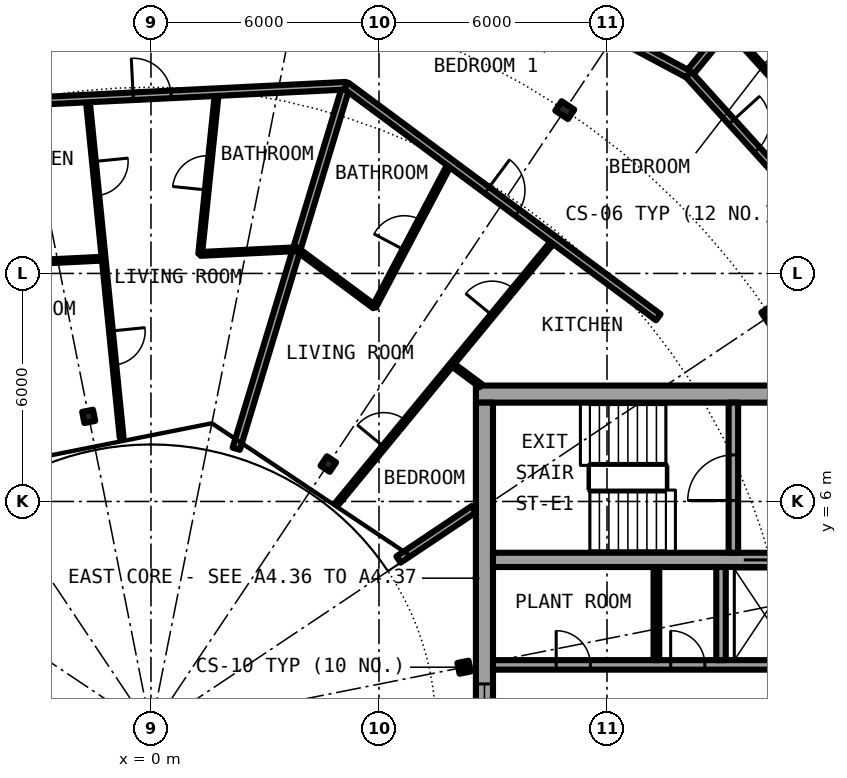
"""IFC4 building model, lengths in metres.
Left out: names, types, materials, properties, quantities, classifications, styles, units other than length and angle.
Written with IfcOpenShell. Run it as: python <this file> out.ifc"""

import sys

from ifc_helpers import new_model, si_unit, direction, frame, frame_2d, origin, origin_2d, place, context, subcontext, project, spatial, rectangle, i_section, extrude, element, fill, save


model = new_model("IFC4")
c1 = context("Model", 3, precision=1e-05, world=origin(), true_north=direction((0.0, 1.0)))
c2 = subcontext(c1, "Body", "Model", "MODEL_VIEW")
j1 = project(units=[si_unit("LENGTHUNIT", "METRE"), si_unit("PLANEANGLEUNIT", "RADIAN")], contexts=[c1])
p1 = place(None, origin())
s1 = spatial("IfcSite", under=j1, at=p1, CompositionType="ELEMENT")
p2 = place(p1, origin())
s2 = spatial("IfcBuilding", under=s1, at=p2, CompositionType="ELEMENT")
p3 = place(p2, frame((0.0, 0.0, 202.4)))
s3 = spatial("IfcBuildingStorey", under=s2, at=p3, CompositionType="ELEMENT", Elevation=202.4)
for number, where, z_axis, x_axis in (
    (1, (16.297, 10.889, 0.0), (0.0, 0.0, 1.0), (0.831, 0.556, 0.0)),
    (2, (10.889, 16.297, 0.0), (0.0, 0.0, 1.0), (0.556, 0.831, 0.0)),
):
    element("IfcColumn", number, at=place(p3, frame(where, z_axis=z_axis, x_axis=x_axis)), inside=s3, PredefinedType="COLUMN", context=c2, shape_type="SweptSolid", body=[
        extrude(i_section(OverallWidth=0.3, OverallDepth=0.4, WebThickness=0.013, FlangeThickness=0.024, FilletRadius=0.027, at=origin_2d()), origin(), (0.0, 0.0, 1.0), 3.05),
    ])
for number, where, z_axis, x_axis in (
    (3, (8.239, 1.639, 0.0), (0.0, 0.0, 1.0), (0.981, 0.195, 0.0)),
    (4, (4.667, 6.984, 0.0), (0.0, 0.0, 1.0), (0.556, 0.831, 0.0)),
    (5, (-1.639, 8.239, 0.0), (0.0, 0.0, 1.0), (-0.195, 0.981, 0.0)),
):
    element("IfcColumn", number, at=place(p3, frame(where, z_axis=z_axis, x_axis=x_axis)), inside=s3, PredefinedType="COLUMN", context=c2, shape_type="SweptSolid", body=[
        extrude(i_section(OverallWidth=0.3, OverallDepth=0.29, WebThickness=0.009, FlangeThickness=0.014, FilletRadius=0.027, at=origin_2d()), origin(), (0.0, 0.0, 1.0), 3.05),
    ])
p4 = place(p3, frame((22.05, 8.825, 0.0), z_axis=(0.0, 0.0, 1.0), x_axis=(-1.0, 0.0, 0.0)))
e6 = element("IfcWall", 6, at=p4, inside=s3, PredefinedType="SHEAR", context=c2, shape_type="SweptSolid", body=[
    extrude(rectangle(XDim=13.5, YDim=0.45, at=frame_2d((6.75, 0.0))), origin(), (0.0, 0.0, 1.0), 3.05),
])
p5 = place(p4, frame((0.975, 0.0, 0.0)))
e7 = element("IfcOpeningElement", 7, at=p5, cuts=e6, PredefinedType="OPENING", context=c2, shape_type="SweptSolid", body=[
    extrude(rectangle(XDim=1.2, YDim=2.3, at=frame_2d((0.6, 1.15))), frame((0.0, 0.235, 0.0), z_axis=(0.0, -1.0, 0.0), x_axis=(1.0, 0.0, 0.0)), (0.0, 0.0, 1.0), 0.47),
])
p6 = place(p3, frame((8.775, -8.6, 0.0), z_axis=(0.0, 0.0, 1.0), x_axis=(0.0, 1.0, 0.0)))
e8 = element("IfcWall", 8, at=p6, inside=s3, PredefinedType="SHEAR", context=c2, shape_type="SweptSolid", body=[
    extrude(rectangle(XDim=17.2, YDim=0.45, at=frame_2d((8.6, 0.0))), origin(), (0.0, 0.0, 1.0), 3.05),
])
p7 = place(p6, frame((7.4, 0.0, 0.1)))
e9 = element("IfcOpeningElement", 9, at=p7, cuts=e8, PredefinedType="OPENING", context=c2, shape_type="SweptSolid", body=[
    extrude(rectangle(XDim=2.4, YDim=2.2, at=frame_2d((1.2, 1.1))), frame((0.0, 0.235, 0.0), z_axis=(0.0, -1.0, 0.0), x_axis=(1.0, 0.0, 0.0)), (0.0, 0.0, 1.0), 0.47),
])
p8 = place(p3, frame((9.0, 1.7, 0.0), z_axis=(0.0, 0.0, 1.0), x_axis=(1.0, 0.0, 0.0)))
e10 = element("IfcWall", 10, at=p8, inside=s3, PredefinedType="SHEAR", context=c2, shape_type="SweptSolid", body=[
    extrude(rectangle(XDim=10.15, YDim=0.25, at=frame_2d((5.075, 0.0))), origin(), (0.0, 0.0, 1.0), 3.05),
])
p9 = place(p8, frame((1.663, 0.0, 0.0)))
e11 = element("IfcOpeningElement", 11, at=p9, cuts=e10, PredefinedType="OPENING", context=c2, shape_type="SweptSolid", body=[
    extrude(rectangle(XDim=0.9, YDim=2.3, at=frame_2d((0.45, 1.15))), frame((0.0, 0.135, 0.0), z_axis=(0.0, -1.0, 0.0), x_axis=(1.0, 0.0, 0.0)), (0.0, 0.0, 1.0), 0.27),
])
p10 = place(p8, frame((4.675, 0.0, 0.0)))
e12 = element("IfcOpeningElement", 12, at=p10, cuts=e10, PredefinedType="OPENING", context=c2, shape_type="SweptSolid", body=[
    extrude(rectangle(XDim=0.9, YDim=2.3, at=frame_2d((0.45, 1.15))), frame((0.0, 0.135, 0.0), z_axis=(0.0, -1.0, 0.0), x_axis=(1.0, 0.0, 0.0)), (0.0, 0.0, 1.0), 0.27),
])
p11 = place(p8, frame((8.837, 0.0, 0.0)))
e13 = element("IfcOpeningElement", 13, at=p11, cuts=e10, PredefinedType="OPENING", context=c2, shape_type="SweptSolid", body=[
    extrude(rectangle(XDim=0.9, YDim=2.3, at=frame_2d((0.45, 1.15))), frame((0.0, 0.135, 0.0), z_axis=(0.0, -1.0, 0.0), x_axis=(1.0, 0.0, 0.0)), (0.0, 0.0, 1.0), 0.27),
])
p12 = place(p3, frame((9.0, 4.462, 0.0), z_axis=(0.0, 0.0, 1.0), x_axis=(1.0, 0.0, 0.0)))
e14 = element("IfcWall", 14, at=p12, inside=s3, PredefinedType="SHEAR", context=c2, shape_type="SweptSolid", body=[
    extrude(rectangle(XDim=10.15, YDim=0.375, at=frame_2d((5.075, 0.0))), origin(), (0.0, 0.0, 1.0), 3.05),
])
p13 = place(p12, frame((6.6, 0.0, 0.0)))
e15 = element("IfcOpeningElement", 15, at=p13, cuts=e14, PredefinedType="OPENING", context=c2, shape_type="SweptSolid", body=[
    extrude(rectangle(XDim=1.1, YDim=2.3, at=frame_2d((0.55, 1.15))), frame((0.0, 0.198, 0.0), z_axis=(0.0, -1.0, 0.0), x_axis=(1.0, 0.0, 0.0)), (0.0, 0.0, 1.0), 0.395),
])
p14 = place(p3, frame((15.325, 4.65, 0.0), z_axis=(0.0, 0.0, 1.0), x_axis=(0.0, 1.0, 0.0)))
e16 = element("IfcWall", 16, at=p14, inside=s3, PredefinedType="SHEAR", context=c2, shape_type="SweptSolid", body=[
    extrude(rectangle(XDim=3.95, YDim=0.25, at=frame_2d((1.975, 0.0))), origin(), (0.0, 0.0, 1.0), 3.05),
])
p15 = place(p14, frame((1.375, 0.0, 0.0)))
e17 = element("IfcOpeningElement", 17, at=p15, cuts=e16, PredefinedType="OPENING", context=c2, shape_type="SweptSolid", body=[
    extrude(rectangle(XDim=1.2, YDim=2.3, at=frame_2d((0.6, 1.15))), frame((0.0, 0.135, 0.0), z_axis=(0.0, -1.0, 0.0), x_axis=(1.0, 0.0, 0.0)), (0.0, 0.0, 1.0), 0.27),
])
p16 = place(p3, frame((15.0, 1.825, 0.0), z_axis=(0.0, 0.0, 1.0), x_axis=(0.0, 1.0, 0.0)))
e18 = element("IfcWall", 18, at=p16, inside=s3, PredefinedType="SOLIDWALL", context=c2, shape_type="SweptSolid", body=[
    extrude(rectangle(XDim=2.45, YDim=0.25, at=frame_2d((1.225, 0.0))), origin(), (0.0, 0.0, 1.0), 2.7),
])
p17 = place(p3, frame((13.3, 1.825, 0.0), z_axis=(0.0, 0.0, 1.0), x_axis=(0.0, 1.0, 0.0)))
e19 = element("IfcWall", 19, at=p17, inside=s3, PredefinedType="PARTITIONING", context=c2, shape_type="SweptSolid", body=[
    extrude(rectangle(XDim=2.45, YDim=0.15, at=frame_2d((1.225, 0.0))), origin(), (0.0, 0.0, 1.0), 2.7),
])
p18 = place(p3, frame((-1.668, 16.603, 0.0), z_axis=(0.0, 0.0, 1.0), x_axis=(0.099921543882, -0.994995319119, 0.0)))
e20 = element("IfcWall", 20, at=p18, inside=s3, PredefinedType="PARTITIONING", context=c2, shape_type="SweptSolid", body=[
    extrude(rectangle(XDim=8.967, YDim=0.1, at=frame_2d((4.483, 0.0))), origin(), (0.0, 0.0, 1.0), 2.7),
])
p19 = place(p18, frame((1.667, 0.0, 0.0)))
e21 = element("IfcOpeningElement", 21, at=p19, cuts=e20, PredefinedType="OPENING", context=c2, shape_type="SweptSolid", body=[
    extrude(rectangle(XDim=0.9, YDim=2.3, at=frame_2d((0.45, 1.15))), frame((0.0, 0.06, 0.0), z_axis=(0.0, -1.0, 0.0), x_axis=(1.0, 0.0, 0.0)), (0.0, 0.0, 1.0), 0.12),
])
p20 = place(p18, frame((6.15, 0.0, 0.0)))
e22 = element("IfcOpeningElement", 22, at=p20, cuts=e20, PredefinedType="OPENING", context=c2, shape_type="SweptSolid", body=[
    extrude(rectangle(XDim=0.9, YDim=2.3, at=frame_2d((0.45, 1.15))), frame((0.0, 0.06, 0.0), z_axis=(0.0, -1.0, 0.0), x_axis=(1.0, 0.0, 0.0)), (0.0, 0.0, 1.0), 0.12),
])
p21 = place(p3, frame((1.295, 12.515, 0.0), z_axis=(0.0, 0.0, 1.0), x_axis=(0.102875790791, 0.994694210131, 0.0)))
e23 = element("IfcWall", 23, at=p21, inside=s3, PredefinedType="PARTITIONING", context=c2, shape_type="SweptSolid", body=[
    extrude(rectangle(XDim=4.279, YDim=0.1, at=frame_2d((2.139, 0.0))), origin(), (0.0, 0.0, 1.0), 2.7),
])
p22 = place(p21, frame((1.689, 0.0, 0.0)))
e24 = element("IfcOpeningElement", 24, at=p22, cuts=e23, PredefinedType="OPENING", context=c2, shape_type="SweptSolid", body=[
    extrude(rectangle(XDim=0.9, YDim=2.3, at=frame_2d((0.45, 1.15))), frame((0.0, 0.06, 0.0), z_axis=(0.0, -1.0, 0.0), x_axis=(1.0, 0.0, 0.0)), (0.0, 0.0, 1.0), 0.12),
])
p23 = place(p3, frame((2.244, 7.387, 0.0), z_axis=(0.0, 0.0, 1.0), x_axis=(0.290078004911, 0.957003004732, 0.0)))
e25 = element("IfcWall", 25, at=p23, inside=s3, PredefinedType="PARTITIONING", context=c2, shape_type="SweptSolid", body=[
    extrude(rectangle(XDim=9.98, YDim=0.2, at=frame_2d((4.99, 0.0))), origin(), (0.0, 0.0, 1.0), 2.7),
])
p24 = place(p3, frame((4.909, 5.958, 0.0), z_axis=(0.0, 0.0, 1.0), x_axis=(0.635879010442, 0.771788756124, 0.0)))
e26 = element("IfcWall", 26, at=p24, inside=s3, PredefinedType="PARTITIONING", context=c2, shape_type="SweptSolid", body=[
    extrude(rectangle(XDim=8.967, YDim=0.1, at=frame_2d((4.484, 0.0))), origin(), (0.0, 0.0, 1.0), 2.7),
])
p25 = place(p24, frame((6.4, 0.0, 0.0)))
e27 = element("IfcOpeningElement", 27, at=p25, cuts=e26, PredefinedType="OPENING", context=c2, shape_type="SweptSolid", body=[
    extrude(rectangle(XDim=0.9, YDim=2.3, at=frame_2d((0.45, 1.15))), frame((0.0, 0.06, 0.0), z_axis=(0.0, -1.0, 0.0), x_axis=(1.0, 0.0, 0.0)), (0.0, 0.0, 1.0), 0.12),
])
p26 = place(p24, frame((1.917, 0.0, 0.0)))
e28 = element("IfcOpeningElement", 28, at=p26, cuts=e26, PredefinedType="OPENING", context=c2, shape_type="SweptSolid", body=[
    extrude(rectangle(XDim=0.9, YDim=2.3, at=frame_2d((0.45, 1.15))), frame((0.0, 0.06, 0.0), z_axis=(0.0, -1.0, 0.0), x_axis=(1.0, 0.0, 0.0)), (0.0, 0.0, 1.0), 0.12),
])
p27 = place(p3, frame((5.877, 11.125, 0.0), z_axis=(0.0, 0.0, 1.0), x_axis=(0.467030118529, 0.884241408432, 0.0)))
e29 = element("IfcWall", 29, at=p27, inside=s3, PredefinedType="PARTITIONING", context=c2, shape_type="SweptSolid", body=[
    extrude(rectangle(XDim=4.278, YDim=0.1, at=frame_2d((2.139, 0.0))), origin(), (0.0, 0.0, 1.0), 2.7),
])
p28 = place(p27, frame((1.689, 0.0, 0.0)))
e30 = element("IfcOpeningElement", 30, at=p28, cuts=e29, PredefinedType="OPENING", context=c2, shape_type="SweptSolid", body=[
    extrude(rectangle(XDim=0.9, YDim=2.3, at=frame_2d((0.45, 1.15))), frame((0.0, 0.06, 0.0), z_axis=(0.0, -1.0, 0.0), x_axis=(1.0, 0.0, 0.0)), (0.0, 0.0, 1.0), 0.12),
])
p29 = place(p3, frame((14.147, 17.238, 0.0), z_axis=(0.0, 0.0, 1.0), x_axis=(0.634374159378, 0.773026148273, 0.0)))
e31 = element("IfcWall", 31, at=p29, inside=s3, PredefinedType="PARTITIONING", context=c2, shape_type="SweptSolid", body=[
    extrude(rectangle(XDim=4.876, YDim=0.2, at=frame_2d((2.438, 0.0))), origin(), (0.0, 0.0, 1.0), 2.7),
])
p30 = place(p3, frame((6.513, 4.472, 0.0), z_axis=(0.0, 0.0, 1.0), x_axis=(0.831403409976, 0.555669299026, 0.0)))
e32 = element("IfcWall", 32, at=p30, inside=s3, PredefinedType="PARTITIONING", context=c2, shape_type="SweptSolid", body=[
    extrude(rectangle(XDim=2.383, YDim=0.2, at=frame_2d((1.191, 0.0))), origin(), (0.0, 0.0, 1.0), 2.7),
])
p31 = place(p3, frame((-5.055, 12.204, 0.0), z_axis=(0.0, 0.0, 1.0), x_axis=(0.998816217325, 0.048643231882, 0.0)))
e33 = element("IfcWall", 33, at=p31, inside=s3, PredefinedType="PARTITIONING", context=c2, shape_type="SweptSolid", body=[
    extrude(rectangle(XDim=3.82, YDim=0.1, at=frame_2d((1.91, 0.0))), origin(), (0.0, 0.0, 1.0), 2.7),
])
p32 = place(p3, frame((1.3, 12.514, 0.0), z_axis=(0.0, 0.0, 1.0), x_axis=(0.99880915717, 0.048787985754, 0.0)))
e34 = element("IfcWall", 34, at=p32, inside=s3, PredefinedType="PARTITIONING", context=c2, shape_type="SweptSolid", body=[
    extrude(rectangle(XDim=2.542, YDim=0.1, at=frame_2d((1.271, 0.0))), origin(), (0.0, 0.0, 1.0), 2.7),
])
p33 = place(p3, frame((3.834, 12.64, 0.0), z_axis=(0.0, 0.0, 1.0), x_axis=(0.803259509791, -0.595629213463, 0.0)))
e35 = element("IfcWall", 35, at=p33, inside=s3, PredefinedType="PARTITIONING", context=c2, shape_type="SweptSolid", body=[
    extrude(rectangle(XDim=2.543, YDim=0.1, at=frame_2d((1.272, 0.0))), origin(), (0.0, 0.0, 1.0), 2.7),
])
p34 = place(p3, frame((7.922, 9.609, 0.0), z_axis=(0.0, 0.0, 1.0), x_axis=(0.802974061841, -0.596013972999, 0.0)))
e36 = element("IfcWall", 36, at=p34, inside=s3, PredefinedType="PARTITIONING", context=c2, shape_type="SweptSolid", body=[
    extrude(rectangle(XDim=0.943, YDim=0.1, at=frame_2d((0.471, 0.0))), origin(), (0.0, 0.0, 1.0), 2.7),
])
p35 = place(p3, frame((-6.783, 16.35, 0.0), z_axis=(0.0, 0.0, 1.0), x_axis=(0.998781156301, 0.049357895202, 0.0)))
e37 = element("IfcWall", 37, at=p35, inside=s3, PredefinedType="PARTITIONING", context=c2, shape_type="SweptSolid", body=[
    extrude(rectangle(XDim=11.931, YDim=0.2, at=frame_2d((5.965, 0.0))), origin(), (0.0, 0.0, 1.0), 2.7),
])
p36 = place(p35, frame((6.322, 0.0, 0.0)))
e38 = element("IfcOpeningElement", 38, at=p36, cuts=e37, PredefinedType="OPENING", context=c2, shape_type="SweptSolid", body=[
    extrude(rectangle(XDim=1.0, YDim=2.3, at=frame_2d((0.5, 1.15))), frame((0.0, 0.11, 0.0), z_axis=(0.0, -1.0, 0.0), x_axis=(1.0, 0.0, 0.0)), (0.0, 0.0, 1.0), 0.22),
])
p37 = place(p3, frame((5.137, 16.938, 0.0), z_axis=(0.0, 0.0, 1.0), x_axis=(0.803229232922, -0.595670042371, 0.0)))
e39 = element("IfcWall", 39, at=p37, inside=s3, PredefinedType="PARTITIONING", context=c2, shape_type="SweptSolid", body=[
    extrude(rectangle(XDim=10.224, YDim=0.2, at=frame_2d((5.112, 0.0))), origin(), (0.0, 0.0, 1.0), 2.7),
])
p38 = place(p37, frame((4.612, 0.0, 0.0)))
e40 = element("IfcOpeningElement", 40, at=p38, cuts=e39, PredefinedType="OPENING", context=c2, shape_type="SweptSolid", body=[
    extrude(rectangle(XDim=1.0, YDim=2.3, at=frame_2d((0.5, 1.15))), frame((0.0, 0.11, 0.0), z_axis=(0.0, -1.0, 0.0), x_axis=(1.0, 0.0, 0.0)), (0.0, 0.0, 1.0), 0.22),
])
p39 = place(p3, frame((6.473, 21.34, 0.0), z_axis=(0.0, 0.0, 1.0), x_axis=(0.881869539497, -0.471493494448, 0.0)))
e41 = element("IfcWall", 41, at=p39, inside=s3, PredefinedType="PARTITIONING", context=c2, shape_type="SweptSolid", body=[
    extrude(rectangle(XDim=8.704, YDim=0.2, at=frame_2d((4.352, 0.0))), origin(), (0.0, 0.0, 1.0), 2.7),
])
p40 = place(p39, frame((4.939, 0.0, 0.0)))
e42 = element("IfcOpeningElement", 42, at=p40, cuts=e41, PredefinedType="OPENING", context=c2, shape_type="SweptSolid", body=[
    extrude(rectangle(XDim=1.0, YDim=2.3, at=frame_2d((0.5, 1.15))), frame((0.0, 0.11, 0.0), z_axis=(0.0, -1.0, 0.0), x_axis=(1.0, 0.0, 0.0)), (0.0, 0.0, 1.0), 0.22),
])
p41 = place(p3, frame((14.147, 17.238, 0.0), z_axis=(0.0, 0.0, 1.0), x_axis=(0.671561669125, -0.740948665268, 0.0)))
e43 = element("IfcWall", 43, at=p41, inside=s3, PredefinedType="PARTITIONING", context=c2, shape_type="SweptSolid", body=[
    extrude(rectangle(XDim=6.544, YDim=0.2, at=frame_2d((3.272, 0.0))), origin(), (0.0, 0.0, 1.0), 2.7),
])
p42 = place(p41, frame((1.682, 0.0, 0.0)))
e44 = element("IfcOpeningElement", 44, at=p42, cuts=e43, PredefinedType="OPENING", context=c2, shape_type="SweptSolid", body=[
    extrude(rectangle(XDim=1.0, YDim=2.3, at=frame_2d((0.5, 1.15))), frame((0.0, 0.11, 0.0), z_axis=(0.0, -1.0, 0.0), x_axis=(1.0, 0.0, 0.0)), (0.0, 0.0, 1.0), 0.22),
])
p43 = place(p3, frame((15.162, 18.475, 0.0), z_axis=(0.0, 0.0, 1.0), x_axis=(0.671528384412, -0.740978831634, 0.0)))
e45 = element("IfcWall", 45, at=p43, inside=s3, PredefinedType="PARTITIONING", context=c2, shape_type="SweptSolid", body=[
    extrude(rectangle(XDim=2.338, YDim=0.1, at=frame_2d((1.169, 0.0))), origin(), (0.0, 0.0, 1.0), 2.7),
])
p44 = place(p13, origin())
e46 = element("IfcDoor", 46, at=p44, inside=s3, OperationType="DOUBLE_DOOR_SLIDING", PredefinedType="DOOR", context=c2, shape_type="SweptSolid", body=[
    extrude(rectangle(XDim=1.1, YDim=2.3, at=frame_2d((0.55, 1.15))), frame((0.0, 0.025, 0.0), z_axis=(0.0, -1.0, 0.0), x_axis=(1.0, 0.0, 0.0)), (0.0, 0.0, 1.0), 0.05),
])
fill(e15, e46)
p45 = place(p9, origin())
e47 = element("IfcDoor", 47, at=p45, inside=s3, OperationType="SINGLE_SWING_RIGHT", PredefinedType="DOOR", context=c2, shape_type="SweptSolid", body=[
    extrude(rectangle(XDim=0.9, YDim=2.3, at=frame_2d((0.45, 1.15))), frame((0.0, 0.025, 0.0), z_axis=(0.0, -1.0, 0.0), x_axis=(1.0, 0.0, 0.0)), (0.0, 0.0, 1.0), 0.05),
])
fill(e11, e47)
p46 = place(p10, origin())
e48 = element("IfcDoor", 48, at=p46, inside=s3, OperationType="SINGLE_SWING_LEFT", PredefinedType="DOOR", context=c2, shape_type="SweptSolid", body=[
    extrude(rectangle(XDim=0.9, YDim=2.3, at=frame_2d((0.45, 1.15))), frame((0.0, 0.025, 0.0), z_axis=(0.0, -1.0, 0.0), x_axis=(1.0, 0.0, 0.0)), (0.0, 0.0, 1.0), 0.05),
])
fill(e12, e48)
p47 = place(p15, origin())
e49 = element("IfcDoor", 49, at=p47, inside=s3, OperationType="SINGLE_SWING_LEFT", PredefinedType="DOOR", context=c2, shape_type="SweptSolid", body=[
    extrude(rectangle(XDim=1.2, YDim=2.3, at=frame_2d((0.6, 1.15))), frame((0.0, 0.025, 0.0), z_axis=(0.0, -1.0, 0.0), x_axis=(1.0, 0.0, 0.0)), (0.0, 0.0, 1.0), 0.05),
])
fill(e17, e49)
p48 = place(p7, origin())
e50 = element("IfcWindow", 50, at=p48, inside=s3, PartitioningType="SINGLE_PANEL", PredefinedType="WINDOW", context=c2, shape_type="SweptSolid", body=[
    extrude(rectangle(XDim=2.4, YDim=2.2, at=frame_2d((1.2, 1.1))), frame((0.0, 0.03, 0.0), z_axis=(0.0, -1.0, 0.0), x_axis=(1.0, 0.0, 0.0)), (0.0, 0.0, 1.0), 0.06),
])
fill(e9, e50)
p49 = place(p42, origin())
e51 = element("IfcDoor", 51, at=p49, inside=s3, OperationType="SINGLE_SWING_LEFT", PredefinedType="DOOR", context=c2, shape_type="SweptSolid", body=[
    extrude(rectangle(XDim=1.0, YDim=2.3, at=frame_2d((0.5, 1.15))), frame((0.0, 0.025, 0.0), z_axis=(0.0, -1.0, 0.0), x_axis=(1.0, 0.0, 0.0)), (0.0, 0.0, 1.0), 0.05),
])
fill(e44, e51)
p50 = place(p38, origin())
e52 = element("IfcDoor", 52, at=p50, inside=s3, OperationType="SINGLE_SWING_RIGHT", PredefinedType="DOOR", context=c2, shape_type="SweptSolid", body=[
    extrude(rectangle(XDim=1.0, YDim=2.3, at=frame_2d((0.5, 1.15))), frame((0.0, 0.025, 0.0), z_axis=(0.0, -1.0, 0.0), x_axis=(1.0, 0.0, 0.0)), (0.0, 0.0, 1.0), 0.05),
])
fill(e40, e52)
p51 = place(p28, origin())
e53 = element("IfcDoor", 53, at=p51, inside=s3, OperationType="SINGLE_SWING_RIGHT", PredefinedType="DOOR", context=c2, shape_type="SweptSolid", body=[
    extrude(rectangle(XDim=0.9, YDim=2.3, at=frame_2d((0.45, 1.15))), frame((0.0, 0.025, 0.0), z_axis=(0.0, -1.0, 0.0), x_axis=(1.0, 0.0, 0.0)), (0.0, 0.0, 1.0), 0.05),
])
fill(e30, e53)
p52 = place(p25, origin())
e54 = element("IfcDoor", 54, at=p52, inside=s3, OperationType="SINGLE_SWING_RIGHT", PredefinedType="DOOR", context=c2, shape_type="SweptSolid", body=[
    extrude(rectangle(XDim=0.9, YDim=2.3, at=frame_2d((0.45, 1.15))), frame((0.0, 0.025, 0.0), z_axis=(0.0, -1.0, 0.0), x_axis=(1.0, 0.0, 0.0)), (0.0, 0.0, 1.0), 0.05),
])
fill(e27, e54)
p53 = place(p26, origin())
e55 = element("IfcDoor", 55, at=p53, inside=s3, OperationType="SINGLE_SWING_LEFT", PredefinedType="DOOR", context=c2, shape_type="SweptSolid", body=[
    extrude(rectangle(XDim=0.9, YDim=2.3, at=frame_2d((0.45, 1.15))), frame((0.0, 0.025, 0.0), z_axis=(0.0, -1.0, 0.0), x_axis=(1.0, 0.0, 0.0)), (0.0, 0.0, 1.0), 0.05),
])
fill(e28, e55)
p54 = place(p36, origin())
e56 = element("IfcDoor", 56, at=p54, inside=s3, OperationType="SINGLE_SWING_RIGHT", PredefinedType="DOOR", context=c2, shape_type="SweptSolid", body=[
    extrude(rectangle(XDim=1.0, YDim=2.3, at=frame_2d((0.5, 1.15))), frame((0.0, 0.025, 0.0), z_axis=(0.0, -1.0, 0.0), x_axis=(1.0, 0.0, 0.0)), (0.0, 0.0, 1.0), 0.05),
])
fill(e38, e56)
p55 = place(p22, origin())
e57 = element("IfcDoor", 57, at=p55, inside=s3, OperationType="SINGLE_SWING_RIGHT", PredefinedType="DOOR", context=c2, shape_type="SweptSolid", body=[
    extrude(rectangle(XDim=0.9, YDim=2.3, at=frame_2d((0.45, 1.15))), frame((0.0, 0.025, 0.0), z_axis=(0.0, -1.0, 0.0), x_axis=(1.0, 0.0, 0.0)), (0.0, 0.0, 1.0), 0.05),
])
fill(e24, e57)
p56 = place(p19, origin())
e58 = element("IfcDoor", 58, at=p56, inside=s3, OperationType="SINGLE_SWING_LEFT", PredefinedType="DOOR", context=c2, shape_type="SweptSolid", body=[
    extrude(rectangle(XDim=0.9, YDim=2.3, at=frame_2d((0.45, 1.15))), frame((0.0, 0.025, 0.0), z_axis=(0.0, -1.0, 0.0), x_axis=(1.0, 0.0, 0.0)), (0.0, 0.0, 1.0), 0.05),
])
fill(e21, e58)
p57 = place(p20, origin())
e59 = element("IfcDoor", 59, at=p57, inside=s3, OperationType="SINGLE_SWING_RIGHT", PredefinedType="DOOR", context=c2, shape_type="SweptSolid", body=[
    extrude(rectangle(XDim=0.9, YDim=2.3, at=frame_2d((0.45, 1.15))), frame((0.0, 0.025, 0.0), z_axis=(0.0, -1.0, 0.0), x_axis=(1.0, 0.0, 0.0)), (0.0, 0.0, 1.0), 0.05),
])
fill(e22, e59)
save(model, sys.argv[1])
